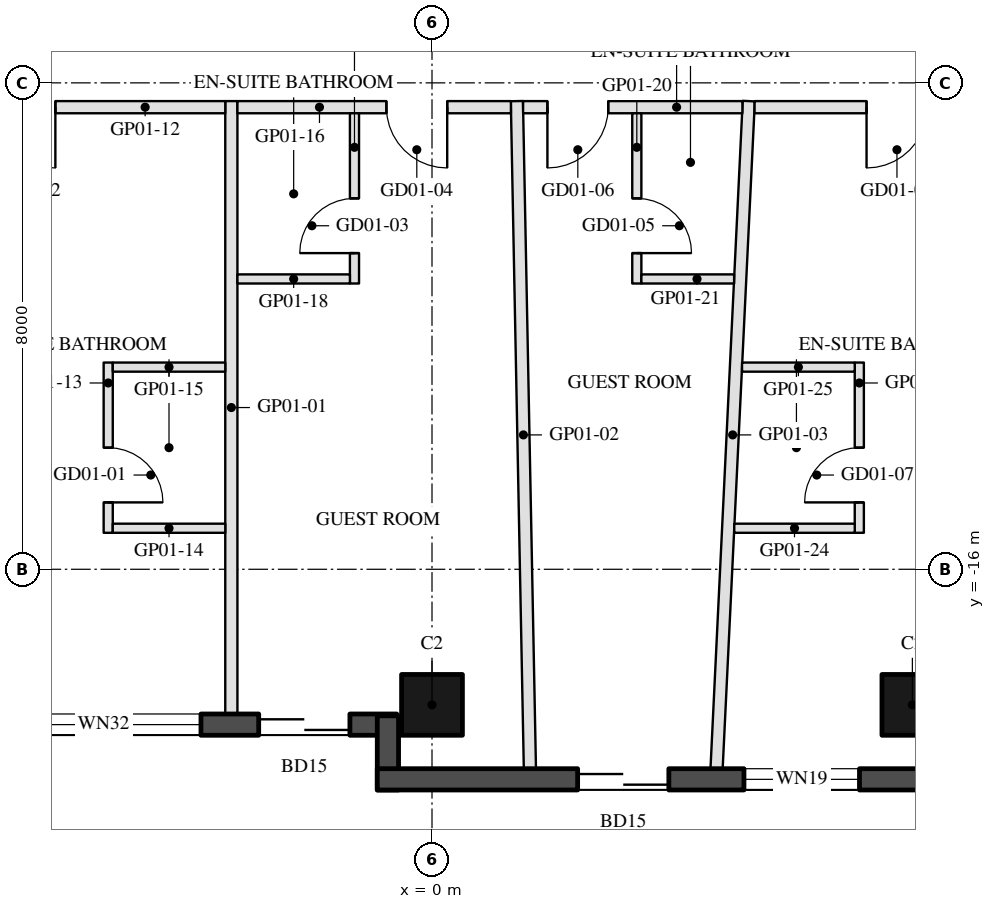
"""IFC4 building model, lengths in metres.
Left out: names, types, materials, properties, quantities, classifications, styles, units other than length and angle.
Written with IfcOpenShell. Run it as: python <this file> out.ifc"""

import sys

from ifc_helpers import new_model, si_unit, direction, frame, frame_2d, origin, origin_2d, place, context, subcontext, project, spatial, rectangle, hollow_rectangle, extrude, element, fill, save


model = new_model("IFC4")
c1 = context("Model", 3, precision=1e-05, world=origin(), true_north=direction((0.0, 1.0)))
c2 = subcontext(c1, "Body", "Model", "MODEL_VIEW")
j1 = project(units=[si_unit("LENGTHUNIT", "METRE"), si_unit("PLANEANGLEUNIT", "RADIAN")], contexts=[c1])
p1 = place(None, origin())
s1 = spatial("IfcSite", under=j1, at=p1, CompositionType="ELEMENT")
p2 = place(p1, origin())
s2 = spatial("IfcBuilding", under=s1, at=p2, CompositionType="ELEMENT")
p3 = place(p2, frame((0.0, 0.0, 50.2)))
s3 = spatial("IfcBuildingStorey", under=s2, at=p3, CompositionType="ELEMENT", Elevation=50.2)
for number, where, z_axis, x_axis in (
    (1, (0.0, -18.23, 0.0), (0.0, 0.0, 1.0), (-1.0, 0.0, 0.0)),
    (2, (7.9, -18.23, 0.0), (0.0, 0.0, 1.0), (-1.0, 0.0, 0.0)),
):
    element("IfcColumn", number, at=place(p3, frame(where, z_axis=z_axis, x_axis=x_axis)), inside=s3, PredefinedType="COLUMN", context=c2, shape_type="SweptSolid", body=[
        extrude(hollow_rectangle(XDim=1.0, YDim=1.0, WallThickness=0.045, at=origin_2d()), origin(), (0.0, 0.0, 1.0), 3.7),
    ])
p4 = place(p3, frame((-7.32, -18.555, 0.0), z_axis=(0.0, 0.0, 1.0), x_axis=(1.0, 0.0, 0.0)))
e3 = element("IfcWall", 3, at=p4, inside=s3, PredefinedType="SOLIDWALL", context=c2, shape_type="SweptSolid", body=[
    extrude(rectangle(XDim=6.74, YDim=0.35, at=frame_2d((3.37, 0.0))), origin(), (0.0, 0.0, 1.0), 3.55),
])
p5 = place(p4, frame((0.32, 0.0, 0.3)))
e4 = element("IfcOpeningElement", 4, at=p5, cuts=e3, PredefinedType="OPENING", context=c2, shape_type="SweptSolid", body=[
    extrude(rectangle(XDim=3.2, YDim=2.65, at=frame_2d((1.6, 1.325))), frame((0.0, 0.185, 0.0), z_axis=(0.0, -1.0, 0.0), x_axis=(1.0, 0.0, 0.0)), (0.0, 0.0, 1.0), 0.37),
])
p6 = place(p4, frame((4.47, 0.0, 0.0)))
e5 = element("IfcOpeningElement", 5, at=p6, cuts=e3, PredefinedType="OPENING", context=c2, shape_type="SweptSolid", body=[
    extrude(rectangle(XDim=1.5, YDim=2.4, at=frame_2d((0.75, 1.2))), frame((0.0, 0.185, 0.0), z_axis=(0.0, -1.0, 0.0), x_axis=(1.0, 0.0, 0.0)), (0.0, 0.0, 1.0), 0.37),
])
p7 = place(p3, frame((-0.725, -18.41, 0.0), z_axis=(0.0, 0.0, 1.0), x_axis=(0.0, -1.0, 0.0)))
e6 = element("IfcWall", 6, at=p7, inside=s3, PredefinedType="SOLIDWALL", context=c2, shape_type="SweptSolid", body=[
    extrude(rectangle(XDim=1.22, YDim=0.35, at=frame_2d((0.61, 0.0))), origin(), (0.0, 0.0, 1.0), 3.55),
])
p8 = place(p3, frame((-0.9, -19.455, 0.0), z_axis=(0.0, 0.0, 1.0), x_axis=(1.0, 0.0, 0.0)))
e7 = element("IfcWall", 7, at=p8, inside=s3, PredefinedType="SOLIDWALL", context=c2, shape_type="SweptSolid", body=[
    extrude(rectangle(XDim=9.7, YDim=0.35, at=frame_2d((4.85, 0.0))), origin(), (0.0, 0.0, 1.0), 3.55),
])
p9 = place(p8, frame((3.295, 0.0, 0.0)))
e8 = element("IfcOpeningElement", 8, at=p9, cuts=e7, PredefinedType="OPENING", context=c2, shape_type="SweptSolid", body=[
    extrude(rectangle(XDim=1.5, YDim=2.4, at=frame_2d((0.75, 1.2))), frame((0.0, 0.185, 0.0), z_axis=(0.0, -1.0, 0.0), x_axis=(1.0, 0.0, 0.0)), (0.0, 0.0, 1.0), 0.37),
])
p10 = place(p8, frame((6.03, 0.0, 0.3)))
e9 = element("IfcOpeningElement", 9, at=p10, cuts=e7, PredefinedType="OPENING", context=c2, shape_type="SweptSolid", body=[
    extrude(rectangle(XDim=1.9, YDim=2.65, at=frame_2d((0.95, 1.325))), frame((0.0, 0.185, 0.0), z_axis=(0.0, -1.0, 0.0), x_axis=(1.0, 0.0, 0.0)), (0.0, 0.0, 1.0), 0.37),
])
p11 = place(p3, frame((-3.3, -18.38, 0.0), z_axis=(0.0, 0.0, 1.0), x_axis=(0.0, 1.0, 0.0)))
e10 = element("IfcWall", 10, at=p11, inside=s3, PredefinedType="PARTITIONING", context=c2, shape_type="SweptSolid", body=[
    extrude(rectangle(XDim=10.08, YDim=0.2, at=frame_2d((5.04, 0.0))), origin(), (0.0, 0.0, 1.0), 2.96),
])
p12 = place(p3, frame((1.61, -19.28, 0.0), z_axis=(0.0, 0.0, 1.0), x_axis=(-0.019496449176, 0.999809926171, 0.0)))
e11 = element("IfcWall", 11, at=p12, inside=s3, PredefinedType="PARTITIONING", context=c2, shape_type="SweptSolid", body=[
    extrude(rectangle(XDim=10.982, YDim=0.2, at=frame_2d((5.491, 0.0))), origin(), (0.0, 0.0, 1.0), 2.96),
])
p13 = place(p3, frame((4.68, -19.28, 0.0), z_axis=(0.0, 0.0, 1.0), x_axis=(0.048194033078, 0.998837992457, 0.0)))
e12 = element("IfcWall", 12, at=p13, inside=s3, PredefinedType="PARTITIONING", context=c2, shape_type="SweptSolid", body=[
    extrude(rectangle(XDim=10.993, YDim=0.2, at=frame_2d((5.496, 0.0))), origin(), (0.0, 0.0, 1.0), 2.96),
])
p14 = place(p3, frame((-3.4, -8.4, 0.0), z_axis=(0.0, 0.0, 1.0), x_axis=(-1.0, 0.0, 0.0)))
e13 = element("IfcWall", 13, at=p14, inside=s3, PredefinedType="PARTITIONING", context=c2, shape_type="SweptSolid", body=[
    extrude(rectangle(XDim=6.588, YDim=0.2, at=frame_2d((3.294, 0.0))), origin(), (0.0, 0.0, 1.0), 2.95),
])
p15 = place(p14, frame((2.794, 0.0, 0.0)))
e14 = element("IfcOpeningElement", 14, at=p15, cuts=e13, PredefinedType="OPENING", context=c2, shape_type="SweptSolid", body=[
    extrude(rectangle(XDim=1.0, YDim=2.1, at=frame_2d((0.5, 1.05))), frame((0.0, 0.11, 0.0), z_axis=(0.0, -1.0, 0.0), x_axis=(1.0, 0.0, 0.0)), (0.0, 0.0, 1.0), 0.22),
])
p16 = place(p3, frame((-5.325, -12.6, 0.0), z_axis=(0.0, 0.0, 1.0), x_axis=(0.0, -1.0, 0.0)))
e15 = element("IfcWall", 15, at=p16, inside=s3, PredefinedType="PARTITIONING", context=c2, shape_type="SweptSolid", body=[
    extrude(rectangle(XDim=2.8, YDim=0.15, at=frame_2d((1.4, 0.0))), origin(), (0.0, 0.0, 1.0), 3.55),
])
p17 = place(p16, frame((1.4, 0.0, 0.0)))
e16 = element("IfcOpeningElement", 16, at=p17, cuts=e15, PredefinedType="OPENING", context=c2, shape_type="SweptSolid", body=[
    extrude(rectangle(XDim=0.9, YDim=2.1, at=frame_2d((0.45, 1.05))), frame((0.0, 0.085, 0.0), z_axis=(0.0, -1.0, 0.0), x_axis=(1.0, 0.0, 0.0)), (0.0, 0.0, 1.0), 0.17),
])
for number, where, z_axis, x_axis in (
    (17, (-5.25, -15.325, 0.0), (0.0, 0.0, 1.0), (1.0, 0.0, 0.0)),
    (18, (-5.25, -12.675, 0.0), (0.0, 0.0, 1.0), (1.0, 0.0, 0.0)),
):
    element("IfcWall", number, at=place(p3, frame(where, z_axis=z_axis, x_axis=x_axis)), inside=s3, PredefinedType="PARTITIONING", context=c2, shape_type="SweptSolid", body=[
        extrude(rectangle(XDim=1.85, YDim=0.15, at=frame_2d((0.925, 0.0))), origin(), (0.0, 0.0, 1.0), 2.95),
    ])
p18 = place(p3, frame((1.298, -8.4, 0.0), z_axis=(0.0, 0.0, 1.0), x_axis=(-1.0, 0.0, 0.0)))
e19 = element("IfcWall", 19, at=p18, inside=s3, PredefinedType="PARTITIONING", context=c2, shape_type="SweptSolid", body=[
    extrude(rectangle(XDim=4.498, YDim=0.2, at=frame_2d((2.249, 0.0))), origin(), (0.0, 0.0, 1.0), 2.95),
])
p19 = place(p18, frame((1.048, 0.0, 0.0)))
e20 = element("IfcOpeningElement", 20, at=p19, cuts=e19, PredefinedType="OPENING", context=c2, shape_type="SweptSolid", body=[
    extrude(rectangle(XDim=1.0, YDim=2.1, at=frame_2d((0.5, 1.05))), frame((0.0, 0.11, 0.0), z_axis=(0.0, -1.0, 0.0), x_axis=(1.0, 0.0, 0.0)), (0.0, 0.0, 1.0), 0.22),
])
p20 = place(p3, frame((-1.275, -11.3, 0.0), z_axis=(0.0, 0.0, 1.0), x_axis=(0.0, 1.0, 0.0)))
e21 = element("IfcWall", 21, at=p20, inside=s3, PredefinedType="PARTITIONING", context=c2, shape_type="SweptSolid", body=[
    extrude(rectangle(XDim=2.8, YDim=0.15, at=frame_2d((1.4, 0.0))), origin(), (0.0, 0.0, 1.0), 3.55),
])
p21 = place(p20, frame((0.5, 0.0, 0.0)))
e22 = element("IfcOpeningElement", 22, at=p21, cuts=e21, PredefinedType="OPENING", context=c2, shape_type="SweptSolid", body=[
    extrude(rectangle(XDim=0.9, YDim=2.1, at=frame_2d((0.45, 1.05))), frame((0.0, 0.085, 0.0), z_axis=(0.0, -1.0, 0.0), x_axis=(1.0, 0.0, 0.0)), (0.0, 0.0, 1.0), 0.17),
])
p22 = place(p3, frame((-3.2, -11.225, 0.0), z_axis=(0.0, 0.0, 1.0), x_axis=(1.0, 0.0, 0.0)))
e23 = element("IfcWall", 23, at=p22, inside=s3, PredefinedType="PARTITIONING", context=c2, shape_type="SweptSolid", body=[
    extrude(rectangle(XDim=1.85, YDim=0.15, at=frame_2d((0.925, 0.0))), origin(), (0.0, 0.0, 1.0), 3.55),
])
p23 = place(p3, frame((5.105, -8.4, 0.0), z_axis=(0.0, 0.0, 1.0), x_axis=(-1.0, 0.0, 0.0)))
e24 = element("IfcWall", 24, at=p23, inside=s3, PredefinedType="PARTITIONING", context=c2, shape_type="SweptSolid", body=[
    extrude(rectangle(XDim=3.607, YDim=0.2, at=frame_2d((1.803, 0.0))), origin(), (0.0, 0.0, 1.0), 2.95),
])
p24 = place(p23, frame((2.207, 0.0, 0.0)))
e25 = element("IfcOpeningElement", 25, at=p24, cuts=e24, PredefinedType="OPENING", context=c2, shape_type="SweptSolid", body=[
    extrude(rectangle(XDim=1.0, YDim=2.1, at=frame_2d((0.5, 1.05))), frame((0.0, 0.11, 0.0), z_axis=(0.0, -1.0, 0.0), x_axis=(1.0, 0.0, 0.0)), (0.0, 0.0, 1.0), 0.22),
])
p25 = place(p3, frame((3.368, -8.5, 0.0), z_axis=(0.0, 0.0, 1.0), x_axis=(0.0, -1.0, 0.0)))
e26 = element("IfcWall", 26, at=p25, inside=s3, PredefinedType="PARTITIONING", context=c2, shape_type="SweptSolid", body=[
    extrude(rectangle(XDim=2.8, YDim=0.15, at=frame_2d((1.4, 0.0))), origin(), (0.0, 0.0, 1.0), 3.55),
])
p26 = place(p25, frame((1.4, 0.0, 0.0)))
e27 = element("IfcOpeningElement", 27, at=p26, cuts=e26, PredefinedType="OPENING", context=c2, shape_type="SweptSolid", body=[
    extrude(rectangle(XDim=0.9, YDim=2.1, at=frame_2d((0.45, 1.05))), frame((0.0, 0.085, 0.0), z_axis=(0.0, -1.0, 0.0), x_axis=(1.0, 0.0, 0.0)), (0.0, 0.0, 1.0), 0.17),
])
p27 = place(p3, frame((3.443, -11.225, 0.0), z_axis=(0.0, 0.0, 1.0), x_axis=(1.0, 0.0, 0.0)))
e28 = element("IfcWall", 28, at=p27, inside=s3, PredefinedType="PARTITIONING", context=c2, shape_type="SweptSolid", body=[
    extrude(rectangle(XDim=1.525, YDim=0.15, at=frame_2d((0.763, 0.0))), origin(), (0.0, 0.0, 1.0), 2.95),
])
p28 = place(p3, frame((9.988, -8.4, 0.0), z_axis=(0.0, 0.0, 1.0), x_axis=(-1.0, 0.0, 0.0)))
e29 = element("IfcWall", 29, at=p28, inside=s3, PredefinedType="PARTITIONING", context=c2, shape_type="SweptSolid", body=[
    extrude(rectangle(XDim=4.683, YDim=0.2, at=frame_2d((2.342, 0.0))), origin(), (0.0, 0.0, 1.0), 2.95),
])
p29 = place(p28, frame((1.842, 0.0, 0.0)))
e30 = element("IfcOpeningElement", 30, at=p29, cuts=e29, PredefinedType="OPENING", context=c2, shape_type="SweptSolid", body=[
    extrude(rectangle(XDim=1.0, YDim=2.1, at=frame_2d((0.5, 1.05))), frame((0.0, 0.11, 0.0), z_axis=(0.0, -1.0, 0.0), x_axis=(1.0, 0.0, 0.0)), (0.0, 0.0, 1.0), 0.22),
])
p30 = place(p3, frame((7.027, -15.4, 0.0), z_axis=(0.0, 0.0, 1.0), x_axis=(0.0, 1.0, 0.0)))
e31 = element("IfcWall", 31, at=p30, inside=s3, PredefinedType="PARTITIONING", context=c2, shape_type="SweptSolid", body=[
    extrude(rectangle(XDim=2.8, YDim=0.15, at=frame_2d((1.4, 0.0))), origin(), (0.0, 0.0, 1.0), 3.55),
])
p31 = place(p30, frame((0.5, 0.0, 0.0)))
e32 = element("IfcOpeningElement", 32, at=p31, cuts=e31, PredefinedType="OPENING", context=c2, shape_type="SweptSolid", body=[
    extrude(rectangle(XDim=0.9, YDim=2.1, at=frame_2d((0.45, 1.05))), frame((0.0, 0.085, 0.0), z_axis=(0.0, -1.0, 0.0), x_axis=(1.0, 0.0, 0.0)), (0.0, 0.0, 1.0), 0.17),
])
p32 = place(p3, frame((4.971, -15.325, 0.0), z_axis=(0.0, 0.0, 1.0), x_axis=(1.0, 0.0, 0.0)))
e33 = element("IfcWall", 33, at=p32, inside=s3, PredefinedType="PARTITIONING", context=c2, shape_type="SweptSolid", body=[
    extrude(rectangle(XDim=1.981, YDim=0.15, at=frame_2d((0.991, 0.0))), origin(), (0.0, 0.0, 1.0), 3.55),
])
p33 = place(p3, frame((5.099, -12.675, 0.0), z_axis=(0.0, 0.0, 1.0), x_axis=(1.0, 0.0, 0.0)))
e34 = element("IfcWall", 34, at=p33, inside=s3, PredefinedType="PARTITIONING", context=c2, shape_type="SweptSolid", body=[
    extrude(rectangle(XDim=1.854, YDim=0.15, at=frame_2d((0.927, 0.0))), origin(), (0.0, 0.0, 1.0), 3.55),
])
p34 = place(p5, origin())
e35 = element("IfcWindow", 35, at=p34, inside=s3, PartitioningType="SINGLE_PANEL", PredefinedType="WINDOW", context=c2, shape_type="SweptSolid", body=[
    extrude(rectangle(XDim=3.2, YDim=2.65, at=frame_2d((1.6, 1.325))), frame((0.0, 0.03, 0.0), z_axis=(0.0, -1.0, 0.0), x_axis=(1.0, 0.0, 0.0)), (0.0, 0.0, 1.0), 0.06),
])
fill(e4, e35)
p35 = place(p6, frame((1.5, 0.0, 0.0), z_axis=(0.0, 0.0, 1.0), x_axis=(-1.0, 0.0, 0.0)))
e36 = element("IfcDoor", 36, at=p35, inside=s3, OperationType="SLIDING_TO_LEFT", PredefinedType="DOOR", context=c2, shape_type="SweptSolid", body=[
    extrude(rectangle(XDim=1.5, YDim=2.4, at=frame_2d((0.75, 1.2))), frame((0.0, 0.025, 0.0), z_axis=(0.0, -1.0, 0.0), x_axis=(1.0, 0.0, 0.0)), (0.0, 0.0, 1.0), 0.05),
])
fill(e5, e36)
p36 = place(p9, frame((1.5, 0.0, 0.0), z_axis=(0.0, 0.0, 1.0), x_axis=(-1.0, 0.0, 0.0)))
e37 = element("IfcDoor", 37, at=p36, inside=s3, OperationType="SLIDING_TO_LEFT", PredefinedType="DOOR", context=c2, shape_type="SweptSolid", body=[
    extrude(rectangle(XDim=1.5, YDim=2.4, at=frame_2d((0.75, 1.2))), frame((0.0, 0.025, 0.0), z_axis=(0.0, -1.0, 0.0), x_axis=(1.0, 0.0, 0.0)), (0.0, 0.0, 1.0), 0.05),
])
fill(e8, e37)
p37 = place(p10, origin())
e38 = element("IfcWindow", 38, at=p37, inside=s3, PartitioningType="SINGLE_PANEL", PredefinedType="WINDOW", context=c2, shape_type="SweptSolid", body=[
    extrude(rectangle(XDim=1.9, YDim=2.65, at=frame_2d((0.95, 1.325))), frame((0.0, 0.03, 0.0), z_axis=(0.0, -1.0, 0.0), x_axis=(1.0, 0.0, 0.0)), (0.0, 0.0, 1.0), 0.06),
])
fill(e9, e38)
p38 = place(p17, origin())
e39 = element("IfcDoor", 39, at=p38, inside=s3, OperationType="SINGLE_SWING_RIGHT", PredefinedType="DOOR", context=c2, shape_type="SweptSolid", body=[
    extrude(rectangle(XDim=0.9, YDim=2.1, at=frame_2d((0.45, 1.05))), frame((0.0, 0.025, 0.0), z_axis=(0.0, -1.0, 0.0), x_axis=(1.0, 0.0, 0.0)), (0.0, 0.0, 1.0), 0.05),
])
fill(e16, e39)
p39 = place(p15, origin())
e40 = element("IfcDoor", 40, at=p39, inside=s3, OperationType="SINGLE_SWING_LEFT", PredefinedType="DOOR", context=c2, shape_type="SweptSolid", body=[
    extrude(rectangle(XDim=1.0, YDim=2.1, at=frame_2d((0.5, 1.05))), frame((0.0, 0.025, 0.0), z_axis=(0.0, -1.0, 0.0), x_axis=(1.0, 0.0, 0.0)), (0.0, 0.0, 1.0), 0.05),
])
fill(e14, e40)
p40 = place(p21, origin())
e41 = element("IfcDoor", 41, at=p40, inside=s3, OperationType="SINGLE_SWING_LEFT", PredefinedType="DOOR", context=c2, shape_type="SweptSolid", body=[
    extrude(rectangle(XDim=0.9, YDim=2.1, at=frame_2d((0.45, 1.05))), frame((0.0, 0.025, 0.0), z_axis=(0.0, -1.0, 0.0), x_axis=(1.0, 0.0, 0.0)), (0.0, 0.0, 1.0), 0.05),
])
fill(e22, e41)
p41 = place(p19, origin())
e42 = element("IfcDoor", 42, at=p41, inside=s3, OperationType="SINGLE_SWING_LEFT", PredefinedType="DOOR", context=c2, shape_type="SweptSolid", body=[
    extrude(rectangle(XDim=1.0, YDim=2.1, at=frame_2d((0.5, 1.05))), frame((0.0, 0.025, 0.0), z_axis=(0.0, -1.0, 0.0), x_axis=(1.0, 0.0, 0.0)), (0.0, 0.0, 1.0), 0.05),
])
fill(e20, e42)
p42 = place(p26, origin())
e43 = element("IfcDoor", 43, at=p42, inside=s3, OperationType="SINGLE_SWING_RIGHT", PredefinedType="DOOR", context=c2, shape_type="SweptSolid", body=[
    extrude(rectangle(XDim=0.9, YDim=2.1, at=frame_2d((0.45, 1.05))), frame((0.0, 0.025, 0.0), z_axis=(0.0, -1.0, 0.0), x_axis=(1.0, 0.0, 0.0)), (0.0, 0.0, 1.0), 0.05),
])
fill(e27, e43)
p43 = place(p24, origin())
e44 = element("IfcDoor", 44, at=p43, inside=s3, OperationType="SINGLE_SWING_RIGHT", PredefinedType="DOOR", context=c2, shape_type="SweptSolid", body=[
    extrude(rectangle(XDim=1.0, YDim=2.1, at=frame_2d((0.5, 1.05))), frame((0.0, 0.025, 0.0), z_axis=(0.0, -1.0, 0.0), x_axis=(1.0, 0.0, 0.0)), (0.0, 0.0, 1.0), 0.05),
])
fill(e25, e44)
p44 = place(p31, origin())
e45 = element("IfcDoor", 45, at=p44, inside=s3, OperationType="SINGLE_SWING_LEFT", PredefinedType="DOOR", context=c2, shape_type="SweptSolid", body=[
    extrude(rectangle(XDim=0.9, YDim=2.1, at=frame_2d((0.45, 1.05))), frame((0.0, 0.025, 0.0), z_axis=(0.0, -1.0, 0.0), x_axis=(1.0, 0.0, 0.0)), (0.0, 0.0, 1.0), 0.05),
])
fill(e32, e45)
p45 = place(p29, origin())
e46 = element("IfcDoor", 46, at=p45, inside=s3, OperationType="SINGLE_SWING_RIGHT", PredefinedType="DOOR", context=c2, shape_type="SweptSolid", body=[
    extrude(rectangle(XDim=1.0, YDim=2.1, at=frame_2d((0.5, 1.05))), frame((0.0, 0.025, 0.0), z_axis=(0.0, -1.0, 0.0), x_axis=(1.0, 0.0, 0.0)), (0.0, 0.0, 1.0), 0.05),
])
fill(e30, e46)
save(model, sys.argv[1])
